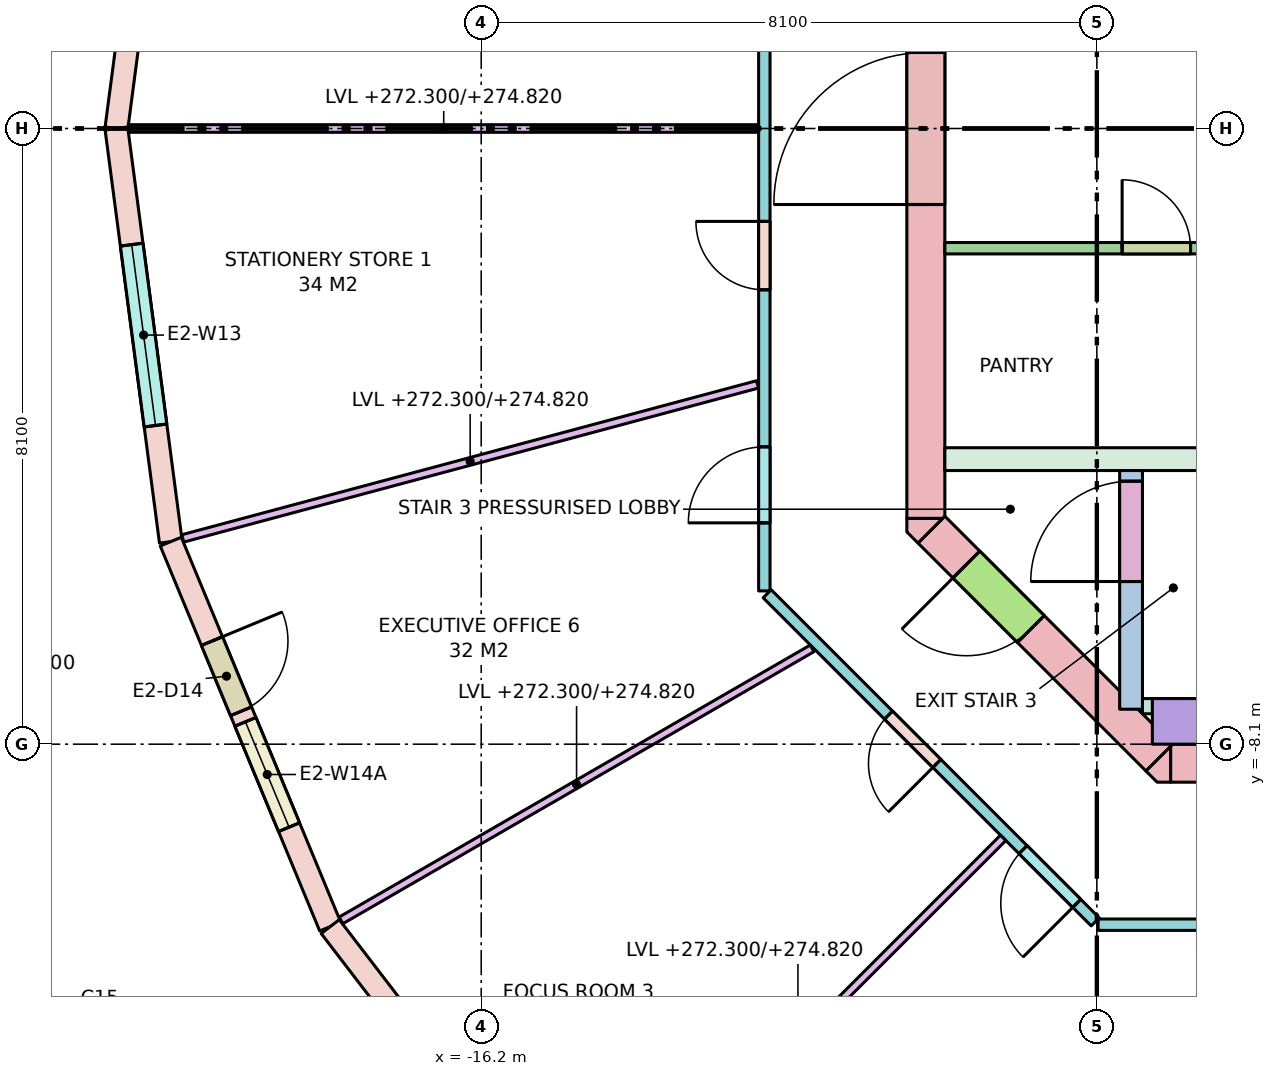
"""IFC4 building model, lengths in metres.
Left out: names, types, materials, properties, quantities, classifications, styles, units other than length and angle.
Written with IfcOpenShell. Run it as: python <this file> out.ifc"""

import sys

from ifc_helpers import new_model, si_unit, direction, frame, frame_2d, origin, place, context, subcontext, project, spatial, polyline, rectangle, outline, extrude, element, fill, save


model = new_model("IFC4")
c1 = context("Model", 3, precision=1e-05, world=origin(), true_north=direction((0.0, 1.0)))
c2 = subcontext(c1, "Body", "Model", "MODEL_VIEW")
j1 = project(units=[si_unit("LENGTHUNIT", "METRE"), si_unit("PLANEANGLEUNIT", "RADIAN")], contexts=[c1])
p1 = place(None, origin())
s1 = spatial("IfcSite", under=j1, at=p1, CompositionType="ELEMENT")
p2 = place(p1, origin())
s2 = spatial("IfcBuilding", under=s1, at=p2, CompositionType="ELEMENT")
p3 = place(p2, frame((0.0, 0.0, 272.3)))
s3 = spatial("IfcBuildingStorey", under=s2, at=p3, CompositionType="ELEMENT", Elevation=272.3)
p4 = place(p3, frame((-7.13, -8.35, -0.28), z_axis=(0.0, 0.0, 1.0), x_axis=(1.0, 0.0, 0.0)))
e1 = element("IfcWall", 1, at=p4, inside=s3, PredefinedType="SHEAR", context=c2, shape_type="SweptSolid", body=[
    extrude(rectangle(XDim=14.26, YDim=0.5, at=frame_2d((7.13, 0.0))), origin(), (0.0, 0.0, 1.0), 3.7),
])
p5 = place(p4, frame((8.08, 0.0, 0.28)))
e2 = element("IfcOpeningElement", 2, at=p5, cuts=e1, PredefinedType="OPENING", context=c2, shape_type="SweptSolid", body=[
    extrude(rectangle(XDim=0.7, YDim=2.1, at=frame_2d((0.35, 1.05))), frame((0.0, 0.26, 0.0), z_axis=(0.0, -1.0, 0.0), x_axis=(1.0, 0.0, 0.0)), (0.0, 0.0, 1.0), 0.52),
])
p6 = place(p4, frame((5.58, 0.0, 0.28)))
e3 = element("IfcOpeningElement", 3, at=p6, cuts=e1, PredefinedType="OPENING", context=c2, shape_type="SweptSolid", body=[
    extrude(rectangle(XDim=0.85, YDim=2.1, at=frame_2d((0.425, 1.05))), frame((0.0, 0.26, 0.0), z_axis=(0.0, -1.0, 0.0), x_axis=(1.0, 0.0, 0.0)), (0.0, 0.0, 1.0), 0.52),
])
p7 = place(p4, frame((6.88, 0.0, 0.28)))
e4 = element("IfcOpeningElement", 4, at=p7, cuts=e1, PredefinedType="OPENING", context=c2, shape_type="SweptSolid", body=[
    extrude(rectangle(XDim=0.85, YDim=2.1, at=frame_2d((0.425, 1.05))), frame((0.0, 0.26, 0.0), z_axis=(0.0, -1.0, 0.0), x_axis=(1.0, 0.0, 0.0)), (0.0, 0.0, 1.0), 0.52),
])
p8 = place(p4, frame((9.445, 0.0, 0.28)))
e5 = element("IfcOpeningElement", 5, at=p8, cuts=e1, PredefinedType="OPENING", context=c2, shape_type="SweptSolid", body=[
    extrude(rectangle(XDim=0.9, YDim=2.1, at=frame_2d((0.45, 1.05))), frame((0.0, 0.26, 0.0), z_axis=(0.0, -1.0, 0.0), x_axis=(1.0, 0.0, 0.0)), (0.0, 0.0, 1.0), 0.52),
])
p9 = place(p4, frame((11.431, 0.0, 0.28)))
e6 = element("IfcOpeningElement", 6, at=p9, cuts=e1, PredefinedType="OPENING", context=c2, shape_type="SweptSolid", body=[
    extrude(rectangle(XDim=0.9, YDim=2.1, at=frame_2d((0.45, 1.05))), frame((0.0, 0.26, 0.0), z_axis=(0.0, -1.0, 0.0), x_axis=(1.0, 0.0, 0.0)), (0.0, 0.0, 1.0), 0.52),
])
p10 = place(p3, frame((-10.35, -5.13, -0.28), z_axis=(0.0, 0.0, 1.0), x_axis=(0.0, 1.0, 0.0)))
e7 = element("IfcWall", 7, at=p10, inside=s3, PredefinedType="SHEAR", context=c2, shape_type="SweptSolid", body=[
    extrude(rectangle(XDim=10.26, YDim=0.5, at=frame_2d((5.13, 0.0))), origin(), (0.0, 0.0, 1.0), 3.7),
])
p11 = place(p10, frame((4.13, 0.0, 0.28)))
e8 = element("IfcOpeningElement", 8, at=p11, cuts=e7, PredefinedType="OPENING", context=c2, shape_type="SweptSolid", body=[
    extrude(rectangle(XDim=2.0, YDim=2.1, at=frame_2d((1.0, 1.05))), frame((0.0, 0.26, 0.0), z_axis=(0.0, -1.0, 0.0), x_axis=(1.0, 0.0, 0.0)), (0.0, 0.0, 1.0), 0.52),
])
p12 = place(p3, frame((-7.277, -8.277, -0.28), z_axis=(0.0, 0.0, 1.0), x_axis=(-0.707106781187, 0.707106781187, 0.0)))
e9 = element("IfcWall", 9, at=p12, inside=s3, PredefinedType="SHEAR", context=c2, shape_type="SweptSolid", body=[
    extrude(rectangle(XDim=4.243, YDim=0.5, at=frame_2d((2.121, 0.0))), origin(), (0.0, 0.0, 1.0), 3.7),
])
p13 = place(p12, frame((2.393, 0.0, 0.28)))
e10 = element("IfcOpeningElement", 10, at=p13, cuts=e9, PredefinedType="OPENING", context=c2, shape_type="SweptSolid", body=[
    extrude(rectangle(XDim=1.2, YDim=2.1, at=frame_2d((0.6, 1.05))), frame((0.0, 0.26, 0.0), z_axis=(0.0, -1.0, 0.0), x_axis=(1.0, 0.0, 0.0)), (0.0, 0.0, 1.0), 0.52),
])
p14 = place(p3, frame((0.0, 0.0, -0.28)))
e11 = element("IfcWall", 11, at=p14, inside=s3, PredefinedType="SHEAR", context=c2, shape_type="SweptSolid", body=[
    extrude(outline(polyline([(-7.307, -8.6), (-7.454, -8.454), (-7.13, -8.13), (-7.13, -8.6), (-7.307, -8.6)])), origin(), (0.0, 0.0, 1.0), 3.7),
])
p15 = place(p3, frame((0.0, 0.0, -0.28)))
e12 = element("IfcWall", 12, at=p15, inside=s3, PredefinedType="SHEAR", context=c2, shape_type="SweptSolid", body=[
    extrude(outline(polyline([(-10.6, -5.307), (-10.6, -5.13), (-10.13, -5.13), (-10.454, -5.454), (-10.6, -5.307)])), origin(), (0.0, 0.0, 1.0), 3.7),
])
p16 = place(p3, frame((-10.1, -4.35, 0.0), z_axis=(0.0, 0.0, 1.0), x_axis=(1.0, 0.0, 0.0)))
e13 = element("IfcWall", 13, at=p16, inside=s3, PredefinedType="SOLIDWALL", context=c2, shape_type="SweptSolid", body=[
    extrude(rectangle(XDim=8.1, YDim=0.3, at=frame_2d((4.05, 0.0))), origin(), (0.0, 0.0, 1.0), 3.42),
])
p17 = place(p3, frame((-7.65, -7.64, 0.0), z_axis=(0.0, 0.0, 1.0), x_axis=(0.0, 1.0, 0.0)))
e14 = element("IfcWall", 14, at=p17, inside=s3, PredefinedType="SHEAR", context=c2, shape_type="SweptSolid", body=[
    extrude(rectangle(XDim=3.14, YDim=0.3, at=frame_2d((1.57, 0.0))), origin(), (0.0, 0.0, 1.0), 3.42),
])
p18 = place(p17, frame((1.68, 0.0, 0.0)))
e15 = element("IfcOpeningElement", 15, at=p18, cuts=e14, PredefinedType="OPENING", context=c2, shape_type="SweptSolid", body=[
    extrude(rectangle(XDim=1.32, YDim=2.1, at=frame_2d((0.66, 1.05))), frame((0.0, 0.16, 0.0), z_axis=(0.0, -1.0, 0.0), x_axis=(1.0, 0.0, 0.0)), (0.0, 0.0, 1.0), 0.32),
])
p19 = place(p3, frame((-7.5, -7.6, 0.0), z_axis=(0.0, 0.0, 1.0), x_axis=(1.0, 0.0, 0.0)))
e16 = element("IfcWall", 16, at=p19, inside=s3, PredefinedType="SHEAR", context=c2, shape_type="SweptSolid", body=[
    extrude(rectangle(XDim=0.6, YDim=0.2, at=frame_2d((0.3, 0.0))), origin(), (0.0, 0.0, 1.0), 3.42),
])
p20 = place(p3, frame((-7.37, -7.8, 0.0), z_axis=(0.0, 0.0, 1.0), x_axis=(1.0, 0.0, 0.0)))
e17 = element("IfcWall", 17, at=p20, inside=s3, PredefinedType="SHEAR", context=c2, shape_type="SweptSolid", body=[
    extrude(rectangle(XDim=5.37, YDim=0.6, at=frame_2d((2.685, 0.0))), origin(), (0.0, 0.0, 1.0), 3.42),
])
p21 = place(p3, frame((-20.284, 5.435, 0.0), z_axis=(0.0, 0.0, 1.0), x_axis=(-0.130527087244, -0.991444743541, 0.0)))
e18 = element("IfcWall", 18, at=p21, inside=s3, PredefinedType="STANDARD", context=c2, shape_type="SweptSolid", body=[
    extrude(rectangle(XDim=5.482, YDim=0.3, at=frame_2d((2.741, 0.0))), origin(), (0.0, 0.0, 1.0), 3.42),
])
p22 = place(p21, frame((1.416, 0.0, 0.0)))
e19 = element("IfcOpeningElement", 19, at=p22, cuts=e18, PredefinedType="OPENING", context=c2, shape_type="SweptSolid", body=[
    extrude(rectangle(XDim=1.0, YDim=2.4, at=frame_2d((0.5, 1.2))), frame((0.0, 0.16, 0.0), z_axis=(0.0, -1.0, 0.0), x_axis=(1.0, 0.0, 0.0)), (0.0, 0.0, 1.0), 0.32),
])
p23 = place(p21, frame((2.566, 0.0, 0.8)))
e20 = element("IfcOpeningElement", 20, at=p23, cuts=e18, PredefinedType="OPENING", context=c2, shape_type="SweptSolid", body=[
    extrude(rectangle(XDim=1.5, YDim=2.4, at=frame_2d((0.75, 1.2))), frame((0.0, 0.16, 0.0), z_axis=(0.0, -1.0, 0.0), x_axis=(1.0, 0.0, 0.0)), (0.0, 0.0, 1.0), 0.32),
])
p24 = place(p3, frame((-21.0, 0.0, 0.0), z_axis=(0.0, 0.0, 1.0), x_axis=(0.130527087244, -0.991444743541, 0.0)))
e21 = element("IfcWall", 21, at=p24, inside=s3, PredefinedType="STANDARD", context=c2, shape_type="SweptSolid", body=[
    extrude(rectangle(XDim=5.482, YDim=0.3, at=frame_2d((2.741, 0.0))), origin(), (0.0, 0.0, 1.0), 3.42),
])
p25 = place(p24, frame((1.541, 0.0, 0.8)))
e22 = element("IfcOpeningElement", 22, at=p25, cuts=e21, PredefinedType="OPENING", context=c2, shape_type="SweptSolid", body=[
    extrude(rectangle(XDim=2.4, YDim=2.4, at=frame_2d((1.2, 1.2))), frame((0.0, 0.16, 0.0), z_axis=(0.0, -1.0, 0.0), x_axis=(1.0, 0.0, 0.0)), (0.0, 0.0, 1.0), 0.32),
])
p26 = place(p3, frame((-20.284, -5.435, 0.0), z_axis=(0.0, 0.0, 1.0), x_axis=(0.382688740813, -0.923877333662, 0.0)))
e23 = element("IfcWall", 23, at=p26, inside=s3, PredefinedType="STANDARD", context=c2, shape_type="SweptSolid", body=[
    extrude(rectangle(XDim=5.482, YDim=0.3, at=frame_2d((2.741, 0.0))), origin(), (0.0, 0.0, 1.0), 3.42),
])
p27 = place(p26, frame((1.416, 0.0, 0.0)))
e24 = element("IfcOpeningElement", 24, at=p27, cuts=e23, PredefinedType="OPENING", context=c2, shape_type="SweptSolid", body=[
    extrude(rectangle(XDim=1.0, YDim=2.4, at=frame_2d((0.5, 1.2))), frame((0.0, 0.16, 0.0), z_axis=(0.0, -1.0, 0.0), x_axis=(1.0, 0.0, 0.0)), (0.0, 0.0, 1.0), 0.32),
])
p28 = place(p26, frame((2.566, 0.0, 0.8)))
e25 = element("IfcOpeningElement", 25, at=p28, cuts=e23, PredefinedType="OPENING", context=c2, shape_type="SweptSolid", body=[
    extrude(rectangle(XDim=1.5, YDim=2.4, at=frame_2d((0.75, 1.2))), frame((0.0, 0.16, 0.0), z_axis=(0.0, -1.0, 0.0), x_axis=(1.0, 0.0, 0.0)), (0.0, 0.0, 1.0), 0.32),
])
p29 = place(p3, frame((-18.187, -10.5, 0.0), z_axis=(0.0, 0.0, 1.0), x_axis=(0.608784891166, -0.793335336593, 0.0)))
e26 = element("IfcWall", 26, at=p29, inside=s3, PredefinedType="STANDARD", context=c2, shape_type="SweptSolid", body=[
    extrude(rectangle(XDim=5.482, YDim=0.3, at=frame_2d((2.741, 0.0))), origin(), (0.0, 0.0, 1.0), 3.42),
])
p30 = place(p29, frame((1.541, 0.0, 0.8)))
e27 = element("IfcOpeningElement", 27, at=p30, cuts=e26, PredefinedType="OPENING", context=c2, shape_type="SweptSolid", body=[
    extrude(rectangle(XDim=2.4, YDim=2.4, at=frame_2d((1.2, 1.2))), frame((0.0, 0.16, 0.0), z_axis=(0.0, -1.0, 0.0), x_axis=(1.0, 0.0, 0.0)), (0.0, 0.0, 1.0), 0.32),
])
p31 = place(p3, frame((-10.1, -1.575, 0.0), z_axis=(0.0, 0.0, 1.0), x_axis=(1.0, 0.0, 0.0)))
e28 = element("IfcWall", 28, at=p31, inside=s3, PredefinedType="PARTITIONING", context=c2, shape_type="SweptSolid", body=[
    extrude(rectangle(XDim=8.1, YDim=0.15, at=frame_2d((4.05, 0.0))), origin(), (0.0, 0.0, 1.0), 3.42),
])
p32 = place(p31, frame((2.333, 0.0, 0.0)))
e29 = element("IfcOpeningElement", 29, at=p32, cuts=e28, PredefinedType="OPENING", context=c2, shape_type="SweptSolid", body=[
    extrude(rectangle(XDim=0.9, YDim=2.1, at=frame_2d((0.45, 1.05))), frame((0.0, 0.085, 0.0), z_axis=(0.0, -1.0, 0.0), x_axis=(1.0, 0.0, 0.0)), (0.0, 0.0, 1.0), 0.17),
])
p33 = place(p31, frame((6.35, 0.0, 0.0)))
e30 = element("IfcOpeningElement", 30, at=p33, cuts=e28, PredefinedType="OPENING", context=c2, shape_type="SweptSolid", body=[
    extrude(rectangle(XDim=0.9, YDim=2.1, at=frame_2d((0.45, 1.05))), frame((0.0, 0.085, 0.0), z_axis=(0.0, -1.0, 0.0), x_axis=(1.0, 0.0, 0.0)), (0.0, 0.0, 1.0), 0.17),
])
p34 = place(p3, frame((8.084, -10.475, 0.0), z_axis=(0.0, 0.0, 1.0), x_axis=(-1.0, 0.0, 0.0)))
e31 = element("IfcWall", 31, at=p34, inside=s3, PredefinedType="PARTITIONING", context=c2, shape_type="SweptSolid", body=[
    extrude(rectangle(XDim=16.167, YDim=0.15, at=frame_2d((8.084, 0.0))), origin(), (0.0, 0.0, 1.0), 2.52),
])
p35 = place(p34, frame((12.015, 0.0, 0.0)))
e32 = element("IfcOpeningElement", 32, at=p35, cuts=e31, PredefinedType="OPENING", context=c2, shape_type="SweptSolid", body=[
    extrude(rectangle(XDim=1.0, YDim=2.1, at=frame_2d((0.5, 1.05))), frame((0.0, 0.085, 0.0), z_axis=(0.0, -1.0, 0.0), x_axis=(1.0, 0.0, 0.0)), (0.0, 0.0, 1.0), 0.17),
])
p36 = place(p34, frame((9.038, 0.0, 0.0)))
e33 = element("IfcOpeningElement", 33, at=p36, cuts=e31, PredefinedType="OPENING", context=c2, shape_type="SweptSolid", body=[
    extrude(rectangle(XDim=0.9, YDim=2.1, at=frame_2d((0.45, 1.05))), frame((0.0, 0.085, 0.0), z_axis=(0.0, -1.0, 0.0), x_axis=(1.0, 0.0, 0.0)), (0.0, 0.0, 1.0), 0.17),
])
p37 = place(p34, frame((3.167, 0.0, 0.0)))
e34 = element("IfcOpeningElement", 34, at=p37, cuts=e31, PredefinedType="OPENING", context=c2, shape_type="SweptSolid", body=[
    extrude(rectangle(XDim=1.8, YDim=2.1, at=frame_2d((0.9, 1.05))), frame((0.0, 0.085, 0.0), z_axis=(0.0, -1.0, 0.0), x_axis=(1.0, 0.0, 0.0)), (0.0, 0.0, 1.0), 0.17),
])
p38 = place(p3, frame((-8.121, -10.438, 0.0), z_axis=(0.0, 0.0, 1.0), x_axis=(-0.707106781187, 0.707106781187, 0.0)))
e35 = element("IfcWall", 35, at=p38, inside=s3, PredefinedType="PARTITIONING", context=c2, shape_type="SweptSolid", body=[
    extrude(rectangle(XDim=6.105, YDim=0.15, at=frame_2d((3.053, 0.0))), origin(), (0.0, 0.0, 1.0), 2.52),
])
p39 = place(p38, frame((0.344, 0.0, 0.0)))
e36 = element("IfcOpeningElement", 36, at=p39, cuts=e35, PredefinedType="OPENING", context=c2, shape_type="SweptSolid", body=[
    extrude(rectangle(XDim=1.0, YDim=2.1, at=frame_2d((0.5, 1.05))), frame((0.0, 0.085, 0.0), z_axis=(0.0, -1.0, 0.0), x_axis=(1.0, 0.0, 0.0)), (0.0, 0.0, 1.0), 0.17),
])
p40 = place(p38, frame((2.948, 0.0, 0.0)))
e37 = element("IfcOpeningElement", 37, at=p40, cuts=e35, PredefinedType="OPENING", context=c2, shape_type="SweptSolid", body=[
    extrude(rectangle(XDim=0.9, YDim=2.1, at=frame_2d((0.45, 1.05))), frame((0.0, 0.085, 0.0), z_axis=(0.0, -1.0, 0.0), x_axis=(1.0, 0.0, 0.0)), (0.0, 0.0, 1.0), 0.17),
])
p41 = place(p3, frame((-12.475, -6.084, 0.0), z_axis=(0.0, 0.0, 1.0), x_axis=(0.0, 1.0, 0.0)))
e38 = element("IfcWall", 38, at=p41, inside=s3, PredefinedType="PARTITIONING", context=c2, shape_type="SweptSolid", body=[
    extrude(rectangle(XDim=12.167, YDim=0.15, at=frame_2d((6.084, 0.0))), origin(), (0.0, 0.0, 1.0), 2.52),
])
p42 = place(p41, frame((10.272, 0.0, 0.0)))
e39 = element("IfcOpeningElement", 39, at=p42, cuts=e38, PredefinedType="OPENING", context=c2, shape_type="SweptSolid", body=[
    extrude(rectangle(XDim=1.0, YDim=2.1, at=frame_2d((0.5, 1.05))), frame((0.0, 0.085, 0.0), z_axis=(0.0, -1.0, 0.0), x_axis=(1.0, 0.0, 0.0)), (0.0, 0.0, 1.0), 0.17),
])
p43 = place(p41, frame((7.306, 0.0, 0.0)))
e40 = element("IfcOpeningElement", 40, at=p43, cuts=e38, PredefinedType="OPENING", context=c2, shape_type="SweptSolid", body=[
    extrude(rectangle(XDim=0.9, YDim=2.1, at=frame_2d((0.45, 1.05))), frame((0.0, 0.085, 0.0), z_axis=(0.0, -1.0, 0.0), x_axis=(1.0, 0.0, 0.0)), (0.0, 0.0, 1.0), 0.17),
])
p44 = place(p41, frame((3.961, 0.0, 0.0)))
e41 = element("IfcOpeningElement", 41, at=p44, cuts=e38, PredefinedType="OPENING", context=c2, shape_type="SweptSolid", body=[
    extrude(rectangle(XDim=0.9, YDim=2.1, at=frame_2d((0.45, 1.05))), frame((0.0, 0.085, 0.0), z_axis=(0.0, -1.0, 0.0), x_axis=(1.0, 0.0, 0.0)), (0.0, 0.0, 1.0), 0.17),
])
p45 = place(p41, frame((0.896, 0.0, 0.0)))
e42 = element("IfcOpeningElement", 42, at=p45, cuts=e38, PredefinedType="OPENING", context=c2, shape_type="SweptSolid", body=[
    extrude(rectangle(XDim=1.0, YDim=2.1, at=frame_2d((0.5, 1.05))), frame((0.0, 0.085, 0.0), z_axis=(0.0, -1.0, 0.0), x_axis=(1.0, 0.0, 0.0)), (0.0, 0.0, 1.0), 0.17),
])
p46 = place(p3, frame((-12.55, 0.0, 0.0), z_axis=(0.0, 0.0, 1.0), x_axis=(-1.0, 0.0, 0.0)))
e43 = element("IfcWall", 43, at=p46, inside=s3, PredefinedType="PARTITIONING", context=c2, shape_type="SweptSolid", body=[
    extrude(rectangle(XDim=8.287, YDim=0.1, at=frame_2d((4.143, 0.0))), origin(), (0.0, 0.0, 1.0), 2.52),
])
p47 = place(p3, frame((-12.564, -3.367, 0.0), z_axis=(0.0, 0.0, 1.0), x_axis=(-0.965933576344, -0.258790119773, 0.0)))
e44 = element("IfcWall", 44, at=p47, inside=s3, PredefinedType="PARTITIONING", context=c2, shape_type="SweptSolid", body=[
    extrude(rectangle(XDim=7.829, YDim=0.1, at=frame_2d((3.915, 0.0))), origin(), (0.0, 0.0, 1.0), 2.52),
])
p48 = place(p3, frame((-11.846, -6.839, 0.0), z_axis=(0.0, 0.0, 1.0), x_axis=(-0.866011787705, -0.500023583, 0.0)))
e45 = element("IfcWall", 45, at=p48, inside=s3, PredefinedType="PARTITIONING", context=c2, shape_type="SweptSolid", body=[
    extrude(rectangle(XDim=7.158, YDim=0.1, at=frame_2d((3.579, 0.0))), origin(), (0.0, 0.0, 1.0), 2.52),
])
p49 = place(p3, frame((-9.333, -9.333, 0.0), z_axis=(0.0, 0.0, 1.0), x_axis=(-0.707106781187, -0.707106781187, 0.0)))
e46 = element("IfcWall", 46, at=p49, inside=s3, PredefinedType="PARTITIONING", context=c2, shape_type="SweptSolid", body=[
    extrude(rectangle(XDim=7.639, YDim=0.1, at=frame_2d((3.819, 0.0))), origin(), (0.0, 0.0, 1.0), 2.52),
])
p50 = place(p3, frame((-6.105, -10.575, 0.0), z_axis=(0.0, 0.0, 1.0), x_axis=(-0.50001399067, -0.866017326117, 0.0)))
e47 = element("IfcWall", 47, at=p50, inside=s3, PredefinedType="PARTITIONING", context=c2, shape_type="SweptSolid", body=[
    extrude(rectangle(XDim=8.626, YDim=0.1, at=frame_2d((4.313, 0.0))), origin(), (0.0, 0.0, 1.0), 2.52),
])
p51 = place(p25, origin())
e48 = element("IfcWindow", 48, at=p51, inside=s3, PartitioningType="SINGLE_PANEL", PredefinedType="WINDOW", context=c2, shape_type="SweptSolid", body=[
    extrude(rectangle(XDim=2.4, YDim=2.4, at=frame_2d((1.2, 1.2))), frame((0.0, 0.03, 0.0), z_axis=(0.0, -1.0, 0.0), x_axis=(1.0, 0.0, 0.0)), (0.0, 0.0, 1.0), 0.06),
])
fill(e22, e48)
p52 = place(p27, origin())
e49 = element("IfcDoor", 49, at=p52, inside=s3, OperationType="SINGLE_SWING_LEFT", PredefinedType="DOOR", context=c2, shape_type="SweptSolid", body=[
    extrude(rectangle(XDim=1.0, YDim=2.4, at=frame_2d((0.5, 1.2))), frame((0.0, 0.025, 0.0), z_axis=(0.0, -1.0, 0.0), x_axis=(1.0, 0.0, 0.0)), (0.0, 0.0, 1.0), 0.05),
])
fill(e24, e49)
p53 = place(p28, origin())
e50 = element("IfcWindow", 50, at=p53, inside=s3, PartitioningType="SINGLE_PANEL", PredefinedType="WINDOW", context=c2, shape_type="SweptSolid", body=[
    extrude(rectangle(XDim=1.5, YDim=2.4, at=frame_2d((0.75, 1.2))), frame((0.0, 0.03, 0.0), z_axis=(0.0, -1.0, 0.0), x_axis=(1.0, 0.0, 0.0)), (0.0, 0.0, 1.0), 0.06),
])
fill(e25, e50)
p54 = place(p18, origin())
e51 = element("IfcDoor", 51, at=p54, inside=s3, OperationType="DOUBLE_DOOR_SINGLE_SWING", PredefinedType="DOOR", context=c2, shape_type="SweptSolid", body=[
    extrude(rectangle(XDim=1.32, YDim=2.1, at=frame_2d((0.66, 1.05))), frame((0.0, 0.025, 0.0), z_axis=(0.0, -1.0, 0.0), x_axis=(1.0, 0.0, 0.0)), (0.0, 0.0, 1.0), 0.05),
])
fill(e15, e51)
p55 = place(p13, origin())
e52 = element("IfcDoor", 52, at=p55, inside=s3, OperationType="SINGLE_SWING_RIGHT", PredefinedType="DOOR", context=c2, shape_type="SweptSolid", body=[
    extrude(rectangle(XDim=1.2, YDim=2.1, at=frame_2d((0.6, 1.05))), frame((0.0, 0.025, 0.0), z_axis=(0.0, -1.0, 0.0), x_axis=(1.0, 0.0, 0.0)), (0.0, 0.0, 1.0), 0.05),
])
fill(e10, e52)
p56 = place(p11, origin())
e53 = element("IfcDoor", 53, at=p56, inside=s3, OperationType="DOUBLE_DOOR_SINGLE_SWING", PredefinedType="DOOR", context=c2, shape_type="SweptSolid", body=[
    extrude(rectangle(XDim=2.0, YDim=2.1, at=frame_2d((1.0, 1.05))), frame((0.0, 0.025, 0.0), z_axis=(0.0, -1.0, 0.0), x_axis=(1.0, 0.0, 0.0)), (0.0, 0.0, 1.0), 0.05),
])
fill(e8, e53)
p57 = place(p32, origin())
e54 = element("IfcDoor", 54, at=p57, inside=s3, OperationType="SINGLE_SWING_LEFT", PredefinedType="DOOR", context=c2, shape_type="SweptSolid", body=[
    extrude(rectangle(XDim=0.9, YDim=2.1, at=frame_2d((0.45, 1.05))), frame((0.0, 0.025, 0.0), z_axis=(0.0, -1.0, 0.0), x_axis=(1.0, 0.0, 0.0)), (0.0, 0.0, 1.0), 0.05),
])
fill(e29, e54)
p58 = place(p39, origin())
e55 = element("IfcDoor", 55, at=p58, inside=s3, OperationType="SINGLE_SWING_LEFT", PredefinedType="DOOR", context=c2, shape_type="SweptSolid", body=[
    extrude(rectangle(XDim=1.0, YDim=2.1, at=frame_2d((0.5, 1.05))), frame((0.0, 0.025, 0.0), z_axis=(0.0, -1.0, 0.0), x_axis=(1.0, 0.0, 0.0)), (0.0, 0.0, 1.0), 0.05),
])
fill(e36, e55)
p59 = place(p44, origin())
e56 = element("IfcDoor", 56, at=p59, inside=s3, OperationType="SINGLE_SWING_RIGHT", PredefinedType="DOOR", context=c2, shape_type="SweptSolid", body=[
    extrude(rectangle(XDim=0.9, YDim=2.1, at=frame_2d((0.45, 1.05))), frame((0.0, 0.025, 0.0), z_axis=(0.0, -1.0, 0.0), x_axis=(1.0, 0.0, 0.0)), (0.0, 0.0, 1.0), 0.05),
])
fill(e41, e56)
p60 = place(p45, origin())
e57 = element("IfcDoor", 57, at=p60, inside=s3, OperationType="SINGLE_SWING_LEFT", PredefinedType="DOOR", context=c2, shape_type="SweptSolid", body=[
    extrude(rectangle(XDim=1.0, YDim=2.1, at=frame_2d((0.5, 1.05))), frame((0.0, 0.025, 0.0), z_axis=(0.0, -1.0, 0.0), x_axis=(1.0, 0.0, 0.0)), (0.0, 0.0, 1.0), 0.05),
])
fill(e42, e57)
p61 = place(p40, origin())
e58 = element("IfcDoor", 58, at=p61, inside=s3, OperationType="SINGLE_SWING_LEFT", PredefinedType="DOOR", context=c2, shape_type="SweptSolid", body=[
    extrude(rectangle(XDim=0.9, YDim=2.1, at=frame_2d((0.45, 1.05))), frame((0.0, 0.025, 0.0), z_axis=(0.0, -1.0, 0.0), x_axis=(1.0, 0.0, 0.0)), (0.0, 0.0, 1.0), 0.05),
])
fill(e37, e58)
save(model, sys.argv[1])
